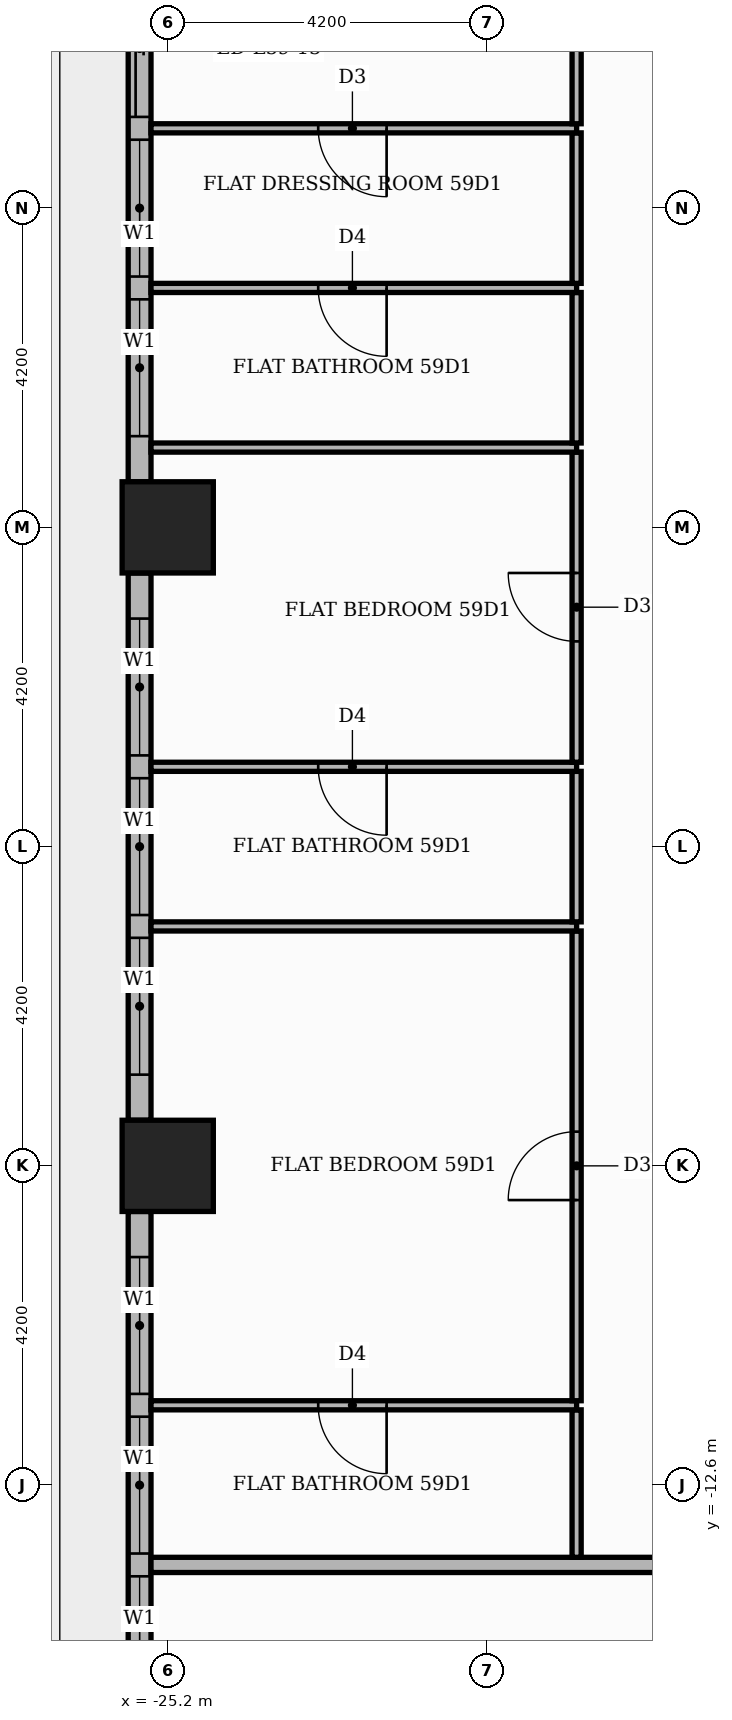
"""IFC4 building model, lengths in metres.
Left out: names, types, materials, properties, quantities, classifications, styles, units other than length and angle.
Written with IfcOpenShell. Run it as: python <this file> out.ifc"""

import sys

from ifc_helpers import new_model, si_unit, direction, frame, frame_2d, origin, origin_2d, place, context, subcontext, project, spatial, rectangle, extrude, element, fill, save


model = new_model("IFC4")
c1 = context("Model", 3, precision=1e-05, world=origin(), true_north=direction((0.0, 1.0)))
c2 = subcontext(c1, "Body", "Model", "MODEL_VIEW")
j1 = project(units=[si_unit("LENGTHUNIT", "METRE"), si_unit("PLANEANGLEUNIT", "RADIAN")], contexts=[c1])
p1 = place(None, origin())
s1 = spatial("IfcSite", under=j1, at=p1, CompositionType="ELEMENT")
p2 = place(p1, origin())
s2 = spatial("IfcBuilding", under=s1, at=p2, CompositionType="ELEMENT")
p3 = place(p2, frame((0.0, 0.0, 248.4)))
s3 = spatial("IfcBuildingStorey", under=s2, at=p3, CompositionType="ELEMENT", Elevation=248.4)
for number, where, z_axis, x_axis in (
    (1, (-25.2, 0.0, 0.0), (0.0, 0.0, 1.0), (1.0, 0.0, 0.0)),
    (2, (-25.2, -8.4, 0.0), (0.0, 0.0, 1.0), (1.0, 0.0, 0.0)),
):
    element("IfcColumn", number, at=place(p3, frame(where, z_axis=z_axis, x_axis=x_axis)), inside=s3, PredefinedType="COLUMN", context=c2, shape_type="SweptSolid", body=[
        extrude(rectangle(XDim=1.2, YDim=1.2, at=origin_2d()), origin(), (0.0, 0.0, 1.0), 3.9),
    ])
p4 = place(p3, frame((-25.57, 7.8, 0.0), z_axis=(0.0, 0.0, 1.0), x_axis=(0.0, -1.0, 0.0)))
e3 = element("IfcWall", 3, at=p4, inside=s3, PredefinedType="STANDARD", context=c2, shape_type="SweptSolid", body=[
    extrude(rectangle(XDim=7.2, YDim=0.3, at=frame_2d((3.6, 0.0))), origin(), (0.0, 0.0, 1.0), 3.48),
])
p5 = place(p4, frame((0.6, 0.0, 0.0)))
e4 = element("IfcOpeningElement", 4, at=p5, cuts=e3, PredefinedType="OPENING", context=c2, shape_type="SweptSolid", body=[
    extrude(rectangle(XDim=1.8, YDim=2.4, at=frame_2d((0.9, 1.2))), frame((0.0, 0.16, 0.0), z_axis=(0.0, -1.0, 0.0), x_axis=(1.0, 0.0, 0.0)), (0.0, 0.0, 1.0), 0.32),
])
p6 = place(p4, frame((2.7, 0.0, 0.9)))
e5 = element("IfcOpeningElement", 5, at=p6, cuts=e3, PredefinedType="OPENING", context=c2, shape_type="SweptSolid", body=[
    extrude(rectangle(XDim=1.8, YDim=2.1, at=frame_2d((0.9, 1.05))), frame((0.0, 0.16, 0.0), z_axis=(0.0, -1.0, 0.0), x_axis=(1.0, 0.0, 0.0)), (0.0, 0.0, 1.0), 0.32),
])
p7 = place(p4, frame((4.8, 0.0, 0.9)))
e6 = element("IfcOpeningElement", 6, at=p7, cuts=e3, PredefinedType="OPENING", context=c2, shape_type="SweptSolid", body=[
    extrude(rectangle(XDim=1.8, YDim=2.1, at=frame_2d((0.9, 1.05))), frame((0.0, 0.16, 0.0), z_axis=(0.0, -1.0, 0.0), x_axis=(1.0, 0.0, 0.0)), (0.0, 0.0, 1.0), 0.32),
])
p8 = place(p3, frame((-25.57, -0.6, 0.0), z_axis=(0.0, 0.0, 1.0), x_axis=(0.0, -1.0, 0.0)))
e7 = element("IfcWall", 7, at=p8, inside=s3, PredefinedType="STANDARD", context=c2, shape_type="SweptSolid", body=[
    extrude(rectangle(XDim=7.2, YDim=0.3, at=frame_2d((3.6, 0.0))), origin(), (0.0, 0.0, 1.0), 3.48),
])
p9 = place(p8, frame((0.6, 0.0, 0.9)))
e8 = element("IfcOpeningElement", 8, at=p9, cuts=e7, PredefinedType="OPENING", context=c2, shape_type="SweptSolid", body=[
    extrude(rectangle(XDim=1.8, YDim=2.1, at=frame_2d((0.9, 1.05))), frame((0.0, 0.16, 0.0), z_axis=(0.0, -1.0, 0.0), x_axis=(1.0, 0.0, 0.0)), (0.0, 0.0, 1.0), 0.32),
])
p10 = place(p8, frame((2.7, 0.0, 0.9)))
e9 = element("IfcOpeningElement", 9, at=p10, cuts=e7, PredefinedType="OPENING", context=c2, shape_type="SweptSolid", body=[
    extrude(rectangle(XDim=1.8, YDim=2.1, at=frame_2d((0.9, 1.05))), frame((0.0, 0.16, 0.0), z_axis=(0.0, -1.0, 0.0), x_axis=(1.0, 0.0, 0.0)), (0.0, 0.0, 1.0), 0.32),
])
p11 = place(p8, frame((4.8, 0.0, 0.9)))
e10 = element("IfcOpeningElement", 10, at=p11, cuts=e7, PredefinedType="OPENING", context=c2, shape_type="SweptSolid", body=[
    extrude(rectangle(XDim=1.8, YDim=2.1, at=frame_2d((0.9, 1.05))), frame((0.0, 0.16, 0.0), z_axis=(0.0, -1.0, 0.0), x_axis=(1.0, 0.0, 0.0)), (0.0, 0.0, 1.0), 0.32),
])
p12 = place(p3, frame((-25.57, -9.0, 0.0), z_axis=(0.0, 0.0, 1.0), x_axis=(0.0, -1.0, 0.0)))
e11 = element("IfcWall", 11, at=p12, inside=s3, PredefinedType="STANDARD", context=c2, shape_type="SweptSolid", body=[
    extrude(rectangle(XDim=7.2, YDim=0.3, at=frame_2d((3.6, 0.0))), origin(), (0.0, 0.0, 1.0), 3.48),
])
p13 = place(p12, frame((0.6, 0.0, 0.9)))
e12 = element("IfcOpeningElement", 12, at=p13, cuts=e11, PredefinedType="OPENING", context=c2, shape_type="SweptSolid", body=[
    extrude(rectangle(XDim=1.8, YDim=2.1, at=frame_2d((0.9, 1.05))), frame((0.0, 0.16, 0.0), z_axis=(0.0, -1.0, 0.0), x_axis=(1.0, 0.0, 0.0)), (0.0, 0.0, 1.0), 0.32),
])
p14 = place(p12, frame((2.7, 0.0, 0.9)))
e13 = element("IfcOpeningElement", 13, at=p14, cuts=e11, PredefinedType="OPENING", context=c2, shape_type="SweptSolid", body=[
    extrude(rectangle(XDim=1.8, YDim=2.1, at=frame_2d((0.9, 1.05))), frame((0.0, 0.16, 0.0), z_axis=(0.0, -1.0, 0.0), x_axis=(1.0, 0.0, 0.0)), (0.0, 0.0, 1.0), 0.32),
])
p15 = place(p12, frame((4.8, 0.0, 0.9)))
e14 = element("IfcOpeningElement", 14, at=p15, cuts=e11, PredefinedType="OPENING", context=c2, shape_type="SweptSolid", body=[
    extrude(rectangle(XDim=1.8, YDim=2.1, at=frame_2d((0.9, 1.05))), frame((0.0, 0.16, 0.0), z_axis=(0.0, -1.0, 0.0), x_axis=(1.0, 0.0, 0.0)), (0.0, 0.0, 1.0), 0.32),
])
p16 = place(p3, frame((-25.42, -13.65, 0.0), z_axis=(0.0, 0.0, 1.0), x_axis=(1.0, 0.0, 0.0)))
e15 = element("IfcWall", 15, at=p16, inside=s3, PredefinedType="PARTITIONING", context=c2, shape_type="SweptSolid", body=[
    extrude(rectangle(XDim=39.07, YDim=0.2, at=frame_2d((19.535, 0.0))), origin(), (0.0, 0.0, 1.0), 3.48),
])
p17 = place(p16, frame((13.32, 0.0, 0.0)))
e16 = element("IfcOpeningElement", 16, at=p17, cuts=e15, PredefinedType="OPENING", context=c2, shape_type="SweptSolid", body=[
    extrude(rectangle(XDim=1.1, YDim=2.4, at=frame_2d((0.55, 1.2))), frame((0.0, 0.11, 0.0), z_axis=(0.0, -1.0, 0.0), x_axis=(1.0, 0.0, 0.0)), (0.0, 0.0, 1.0), 0.22),
])
p18 = place(p3, frame((-19.82, -13.55, 0.0), z_axis=(0.0, 0.0, 1.0), x_axis=(0.0, 1.0, 0.0)))
e17 = element("IfcWall", 17, at=p18, inside=s3, PredefinedType="PARTITIONING", context=c2, shape_type="SweptSolid", body=[
    extrude(rectangle(XDim=1.94, YDim=0.12, at=frame_2d((0.97, 0.0))), origin(), (0.0, 0.0, 1.0), 3.48),
])
p19 = place(p3, frame((-25.42, -11.55, 0.0), z_axis=(0.0, 0.0, 1.0), x_axis=(1.0, 0.0, 0.0)))
e18 = element("IfcWall", 18, at=p19, inside=s3, PredefinedType="PARTITIONING", context=c2, shape_type="SweptSolid", body=[
    extrude(rectangle(XDim=5.6, YDim=0.12, at=frame_2d((2.8, 0.0))), origin(), (0.0, 0.0, 1.0), 3.48),
])
p20 = place(p19, frame((2.2, 0.0, 0.0)))
e19 = element("IfcOpeningElement", 19, at=p20, cuts=e18, PredefinedType="OPENING", context=c2, shape_type="SweptSolid", body=[
    extrude(rectangle(XDim=0.9, YDim=2.1, at=frame_2d((0.45, 1.05))), frame((0.0, 0.07, 0.0), z_axis=(0.0, -1.0, 0.0), x_axis=(1.0, 0.0, 0.0)), (0.0, 0.0, 1.0), 0.14),
])
p21 = place(p3, frame((-19.82, -11.49, 0.0), z_axis=(0.0, 0.0, 1.0), x_axis=(0.0, 1.0, 0.0)))
e20 = element("IfcWall", 20, at=p21, inside=s3, PredefinedType="PARTITIONING", context=c2, shape_type="SweptSolid", body=[
    extrude(rectangle(XDim=6.18, YDim=0.12, at=frame_2d((3.09, 0.0))), origin(), (0.0, 0.0, 1.0), 3.48),
])
p22 = place(p21, frame((2.64, 0.0, 0.0)))
e21 = element("IfcOpeningElement", 21, at=p22, cuts=e20, PredefinedType="OPENING", context=c2, shape_type="SweptSolid", body=[
    extrude(rectangle(XDim=0.9, YDim=2.1, at=frame_2d((0.45, 1.05))), frame((0.0, 0.07, 0.0), z_axis=(0.0, -1.0, 0.0), x_axis=(1.0, 0.0, 0.0)), (0.0, 0.0, 1.0), 0.14),
])
p23 = place(p3, frame((-25.42, -5.25, 0.0), z_axis=(0.0, 0.0, 1.0), x_axis=(1.0, 0.0, 0.0)))
e22 = element("IfcWall", 22, at=p23, inside=s3, PredefinedType="PARTITIONING", context=c2, shape_type="SweptSolid", body=[
    extrude(rectangle(XDim=5.6, YDim=0.12, at=frame_2d((2.8, 0.0))), origin(), (0.0, 0.0, 1.0), 3.48),
])
p24 = place(p3, frame((-19.82, -5.19, 0.0), z_axis=(0.0, 0.0, 1.0), x_axis=(0.0, 1.0, 0.0)))
e23 = element("IfcWall", 23, at=p24, inside=s3, PredefinedType="PARTITIONING", context=c2, shape_type="SweptSolid", body=[
    extrude(rectangle(XDim=1.98, YDim=0.12, at=frame_2d((0.99, 0.0))), origin(), (0.0, 0.0, 1.0), 3.48),
])
p25 = place(p3, frame((-25.42, -3.15, 0.0), z_axis=(0.0, 0.0, 1.0), x_axis=(1.0, 0.0, 0.0)))
e24 = element("IfcWall", 24, at=p25, inside=s3, PredefinedType="PARTITIONING", context=c2, shape_type="SweptSolid", body=[
    extrude(rectangle(XDim=5.6, YDim=0.12, at=frame_2d((2.8, 0.0))), origin(), (0.0, 0.0, 1.0), 3.48),
])
p26 = place(p25, frame((2.2, 0.0, 0.0)))
e25 = element("IfcOpeningElement", 25, at=p26, cuts=e24, PredefinedType="OPENING", context=c2, shape_type="SweptSolid", body=[
    extrude(rectangle(XDim=0.9, YDim=2.1, at=frame_2d((0.45, 1.05))), frame((0.0, 0.07, 0.0), z_axis=(0.0, -1.0, 0.0), x_axis=(1.0, 0.0, 0.0)), (0.0, 0.0, 1.0), 0.14),
])
p27 = place(p3, frame((-19.82, -3.09, 0.0), z_axis=(0.0, 0.0, 1.0), x_axis=(0.0, 1.0, 0.0)))
e26 = element("IfcWall", 26, at=p27, inside=s3, PredefinedType="PARTITIONING", context=c2, shape_type="SweptSolid", body=[
    extrude(rectangle(XDim=4.08, YDim=0.12, at=frame_2d((2.04, 0.0))), origin(), (0.0, 0.0, 1.0), 3.48),
])
p28 = place(p27, frame((1.59, 0.0, 0.0)))
e27 = element("IfcOpeningElement", 27, at=p28, cuts=e26, PredefinedType="OPENING", context=c2, shape_type="SweptSolid", body=[
    extrude(rectangle(XDim=0.9, YDim=2.1, at=frame_2d((0.45, 1.05))), frame((0.0, 0.07, 0.0), z_axis=(0.0, -1.0, 0.0), x_axis=(1.0, 0.0, 0.0)), (0.0, 0.0, 1.0), 0.14),
])
p29 = place(p3, frame((-25.42, 1.05, 0.0), z_axis=(0.0, 0.0, 1.0), x_axis=(1.0, 0.0, 0.0)))
e28 = element("IfcWall", 28, at=p29, inside=s3, PredefinedType="PARTITIONING", context=c2, shape_type="SweptSolid", body=[
    extrude(rectangle(XDim=5.6, YDim=0.12, at=frame_2d((2.8, 0.0))), origin(), (0.0, 0.0, 1.0), 3.48),
])
p30 = place(p3, frame((-19.82, 1.11, 0.0), z_axis=(0.0, 0.0, 1.0), x_axis=(0.0, 1.0, 0.0)))
e29 = element("IfcWall", 29, at=p30, inside=s3, PredefinedType="PARTITIONING", context=c2, shape_type="SweptSolid", body=[
    extrude(rectangle(XDim=1.98, YDim=0.12, at=frame_2d((0.99, 0.0))), origin(), (0.0, 0.0, 1.0), 3.48),
])
p31 = place(p3, frame((-25.42, 3.15, 0.0), z_axis=(0.0, 0.0, 1.0), x_axis=(1.0, 0.0, 0.0)))
e30 = element("IfcWall", 30, at=p31, inside=s3, PredefinedType="PARTITIONING", context=c2, shape_type="SweptSolid", body=[
    extrude(rectangle(XDim=5.6, YDim=0.12, at=frame_2d((2.8, 0.0))), origin(), (0.0, 0.0, 1.0), 3.48),
])
p32 = place(p31, frame((2.2, 0.0, 0.0)))
e31 = element("IfcOpeningElement", 31, at=p32, cuts=e30, PredefinedType="OPENING", context=c2, shape_type="SweptSolid", body=[
    extrude(rectangle(XDim=0.9, YDim=2.1, at=frame_2d((0.45, 1.05))), frame((0.0, 0.07, 0.0), z_axis=(0.0, -1.0, 0.0), x_axis=(1.0, 0.0, 0.0)), (0.0, 0.0, 1.0), 0.14),
])
p33 = place(p3, frame((-19.82, 3.21, 0.0), z_axis=(0.0, 0.0, 1.0), x_axis=(0.0, 1.0, 0.0)))
e32 = element("IfcWall", 32, at=p33, inside=s3, PredefinedType="PARTITIONING", context=c2, shape_type="SweptSolid", body=[
    extrude(rectangle(XDim=1.98, YDim=0.12, at=frame_2d((0.99, 0.0))), origin(), (0.0, 0.0, 1.0), 3.48),
])
p34 = place(p3, frame((-25.42, 5.25, 0.0), z_axis=(0.0, 0.0, 1.0), x_axis=(1.0, 0.0, 0.0)))
e33 = element("IfcWall", 33, at=p34, inside=s3, PredefinedType="PARTITIONING", context=c2, shape_type="SweptSolid", body=[
    extrude(rectangle(XDim=5.6, YDim=0.12, at=frame_2d((2.8, 0.0))), origin(), (0.0, 0.0, 1.0), 3.48),
])
p35 = place(p34, frame((2.2, 0.0, 0.0)))
e34 = element("IfcOpeningElement", 34, at=p35, cuts=e33, PredefinedType="OPENING", context=c2, shape_type="SweptSolid", body=[
    extrude(rectangle(XDim=0.9, YDim=2.1, at=frame_2d((0.45, 1.05))), frame((0.0, 0.07, 0.0), z_axis=(0.0, -1.0, 0.0), x_axis=(1.0, 0.0, 0.0)), (0.0, 0.0, 1.0), 0.14),
])
p36 = place(p3, frame((-19.82, 5.31, 0.0), z_axis=(0.0, 0.0, 1.0), x_axis=(0.0, 1.0, 0.0)))
e35 = element("IfcWall", 35, at=p36, inside=s3, PredefinedType="PARTITIONING", context=c2, shape_type="SweptSolid", body=[
    extrude(rectangle(XDim=6.18, YDim=0.12, at=frame_2d((3.09, 0.0))), origin(), (0.0, 0.0, 1.0), 3.48),
])
p37 = place(p36, frame((2.64, 0.0, 0.0)))
e36 = element("IfcOpeningElement", 36, at=p37, cuts=e35, PredefinedType="OPENING", context=c2, shape_type="SweptSolid", body=[
    extrude(rectangle(XDim=0.9, YDim=2.1, at=frame_2d((0.45, 1.05))), frame((0.0, 0.07, 0.0), z_axis=(0.0, -1.0, 0.0), x_axis=(1.0, 0.0, 0.0)), (0.0, 0.0, 1.0), 0.14),
])
p38 = place(p5, origin())
e37 = element("IfcDoor", 37, at=p38, inside=s3, OperationType="SLIDING_TO_LEFT", PredefinedType="DOOR", context=c2, shape_type="SweptSolid", body=[
    extrude(rectangle(XDim=1.8, YDim=2.4, at=frame_2d((0.9, 1.2))), frame((0.0, 0.025, 0.0), z_axis=(0.0, -1.0, 0.0), x_axis=(1.0, 0.0, 0.0)), (0.0, 0.0, 1.0), 0.05),
])
fill(e4, e37)
p39 = place(p6, origin())
e38 = element("IfcWindow", 38, at=p39, inside=s3, PartitioningType="SINGLE_PANEL", PredefinedType="WINDOW", context=c2, shape_type="SweptSolid", body=[
    extrude(rectangle(XDim=1.8, YDim=2.1, at=frame_2d((0.9, 1.05))), frame((0.0, 0.03, 0.0), z_axis=(0.0, -1.0, 0.0), x_axis=(1.0, 0.0, 0.0)), (0.0, 0.0, 1.0), 0.06),
])
fill(e5, e38)
p40 = place(p7, origin())
e39 = element("IfcWindow", 39, at=p40, inside=s3, PartitioningType="SINGLE_PANEL", PredefinedType="WINDOW", context=c2, shape_type="SweptSolid", body=[
    extrude(rectangle(XDim=1.8, YDim=2.1, at=frame_2d((0.9, 1.05))), frame((0.0, 0.03, 0.0), z_axis=(0.0, -1.0, 0.0), x_axis=(1.0, 0.0, 0.0)), (0.0, 0.0, 1.0), 0.06),
])
fill(e6, e39)
p41 = place(p9, origin())
e40 = element("IfcWindow", 40, at=p41, inside=s3, PartitioningType="SINGLE_PANEL", PredefinedType="WINDOW", context=c2, shape_type="SweptSolid", body=[
    extrude(rectangle(XDim=1.8, YDim=2.1, at=frame_2d((0.9, 1.05))), frame((0.0, 0.03, 0.0), z_axis=(0.0, -1.0, 0.0), x_axis=(1.0, 0.0, 0.0)), (0.0, 0.0, 1.0), 0.06),
])
fill(e8, e40)
p42 = place(p10, origin())
e41 = element("IfcWindow", 41, at=p42, inside=s3, PartitioningType="SINGLE_PANEL", PredefinedType="WINDOW", context=c2, shape_type="SweptSolid", body=[
    extrude(rectangle(XDim=1.8, YDim=2.1, at=frame_2d((0.9, 1.05))), frame((0.0, 0.03, 0.0), z_axis=(0.0, -1.0, 0.0), x_axis=(1.0, 0.0, 0.0)), (0.0, 0.0, 1.0), 0.06),
])
fill(e9, e41)
p43 = place(p11, origin())
e42 = element("IfcWindow", 42, at=p43, inside=s3, PartitioningType="SINGLE_PANEL", PredefinedType="WINDOW", context=c2, shape_type="SweptSolid", body=[
    extrude(rectangle(XDim=1.8, YDim=2.1, at=frame_2d((0.9, 1.05))), frame((0.0, 0.03, 0.0), z_axis=(0.0, -1.0, 0.0), x_axis=(1.0, 0.0, 0.0)), (0.0, 0.0, 1.0), 0.06),
])
fill(e10, e42)
p44 = place(p13, origin())
e43 = element("IfcWindow", 43, at=p44, inside=s3, PartitioningType="SINGLE_PANEL", PredefinedType="WINDOW", context=c2, shape_type="SweptSolid", body=[
    extrude(rectangle(XDim=1.8, YDim=2.1, at=frame_2d((0.9, 1.05))), frame((0.0, 0.03, 0.0), z_axis=(0.0, -1.0, 0.0), x_axis=(1.0, 0.0, 0.0)), (0.0, 0.0, 1.0), 0.06),
])
fill(e12, e43)
p45 = place(p14, origin())
e44 = element("IfcWindow", 44, at=p45, inside=s3, PartitioningType="SINGLE_PANEL", PredefinedType="WINDOW", context=c2, shape_type="SweptSolid", body=[
    extrude(rectangle(XDim=1.8, YDim=2.1, at=frame_2d((0.9, 1.05))), frame((0.0, 0.03, 0.0), z_axis=(0.0, -1.0, 0.0), x_axis=(1.0, 0.0, 0.0)), (0.0, 0.0, 1.0), 0.06),
])
fill(e13, e44)
p46 = place(p15, origin())
e45 = element("IfcWindow", 45, at=p46, inside=s3, PartitioningType="SINGLE_PANEL", PredefinedType="WINDOW", context=c2, shape_type="SweptSolid", body=[
    extrude(rectangle(XDim=1.8, YDim=2.1, at=frame_2d((0.9, 1.05))), frame((0.0, 0.03, 0.0), z_axis=(0.0, -1.0, 0.0), x_axis=(1.0, 0.0, 0.0)), (0.0, 0.0, 1.0), 0.06),
])
fill(e14, e45)
p47 = place(p35, frame((0.9, 0.0, 0.0), z_axis=(0.0, 0.0, 1.0), x_axis=(-1.0, 0.0, 0.0)))
e46 = element("IfcDoor", 46, at=p47, inside=s3, OperationType="SINGLE_SWING_RIGHT", PredefinedType="DOOR", context=c2, shape_type="SweptSolid", body=[
    extrude(rectangle(XDim=0.9, YDim=2.1, at=frame_2d((0.45, 1.05))), frame((0.0, 0.025, 0.0), z_axis=(0.0, -1.0, 0.0), x_axis=(1.0, 0.0, 0.0)), (0.0, 0.0, 1.0), 0.05),
])
fill(e34, e46)
p48 = place(p32, frame((0.9, 0.0, 0.0), z_axis=(0.0, 0.0, 1.0), x_axis=(-1.0, 0.0, 0.0)))
e47 = element("IfcDoor", 47, at=p48, inside=s3, OperationType="SINGLE_SWING_RIGHT", PredefinedType="DOOR", context=c2, shape_type="SweptSolid", body=[
    extrude(rectangle(XDim=0.9, YDim=2.1, at=frame_2d((0.45, 1.05))), frame((0.0, 0.025, 0.0), z_axis=(0.0, -1.0, 0.0), x_axis=(1.0, 0.0, 0.0)), (0.0, 0.0, 1.0), 0.05),
])
fill(e31, e47)
p49 = place(p28, origin())
e48 = element("IfcDoor", 48, at=p49, inside=s3, OperationType="SINGLE_SWING_RIGHT", PredefinedType="DOOR", context=c2, shape_type="SweptSolid", body=[
    extrude(rectangle(XDim=0.9, YDim=2.1, at=frame_2d((0.45, 1.05))), frame((0.0, 0.025, 0.0), z_axis=(0.0, -1.0, 0.0), x_axis=(1.0, 0.0, 0.0)), (0.0, 0.0, 1.0), 0.05),
])
fill(e27, e48)
p50 = place(p26, frame((0.9, 0.0, 0.0), z_axis=(0.0, 0.0, 1.0), x_axis=(-1.0, 0.0, 0.0)))
e49 = element("IfcDoor", 49, at=p50, inside=s3, OperationType="SINGLE_SWING_RIGHT", PredefinedType="DOOR", context=c2, shape_type="SweptSolid", body=[
    extrude(rectangle(XDim=0.9, YDim=2.1, at=frame_2d((0.45, 1.05))), frame((0.0, 0.025, 0.0), z_axis=(0.0, -1.0, 0.0), x_axis=(1.0, 0.0, 0.0)), (0.0, 0.0, 1.0), 0.05),
])
fill(e25, e49)
p51 = place(p22, origin())
e50 = element("IfcDoor", 50, at=p51, inside=s3, OperationType="SINGLE_SWING_LEFT", PredefinedType="DOOR", context=c2, shape_type="SweptSolid", body=[
    extrude(rectangle(XDim=0.9, YDim=2.1, at=frame_2d((0.45, 1.05))), frame((0.0, 0.025, 0.0), z_axis=(0.0, -1.0, 0.0), x_axis=(1.0, 0.0, 0.0)), (0.0, 0.0, 1.0), 0.05),
])
fill(e21, e50)
p52 = place(p20, frame((0.9, 0.0, 0.0), z_axis=(0.0, 0.0, 1.0), x_axis=(-1.0, 0.0, 0.0)))
e51 = element("IfcDoor", 51, at=p52, inside=s3, OperationType="SINGLE_SWING_RIGHT", PredefinedType="DOOR", context=c2, shape_type="SweptSolid", body=[
    extrude(rectangle(XDim=0.9, YDim=2.1, at=frame_2d((0.45, 1.05))), frame((0.0, 0.025, 0.0), z_axis=(0.0, -1.0, 0.0), x_axis=(1.0, 0.0, 0.0)), (0.0, 0.0, 1.0), 0.05),
])
fill(e19, e51)
save(model, sys.argv[1])
